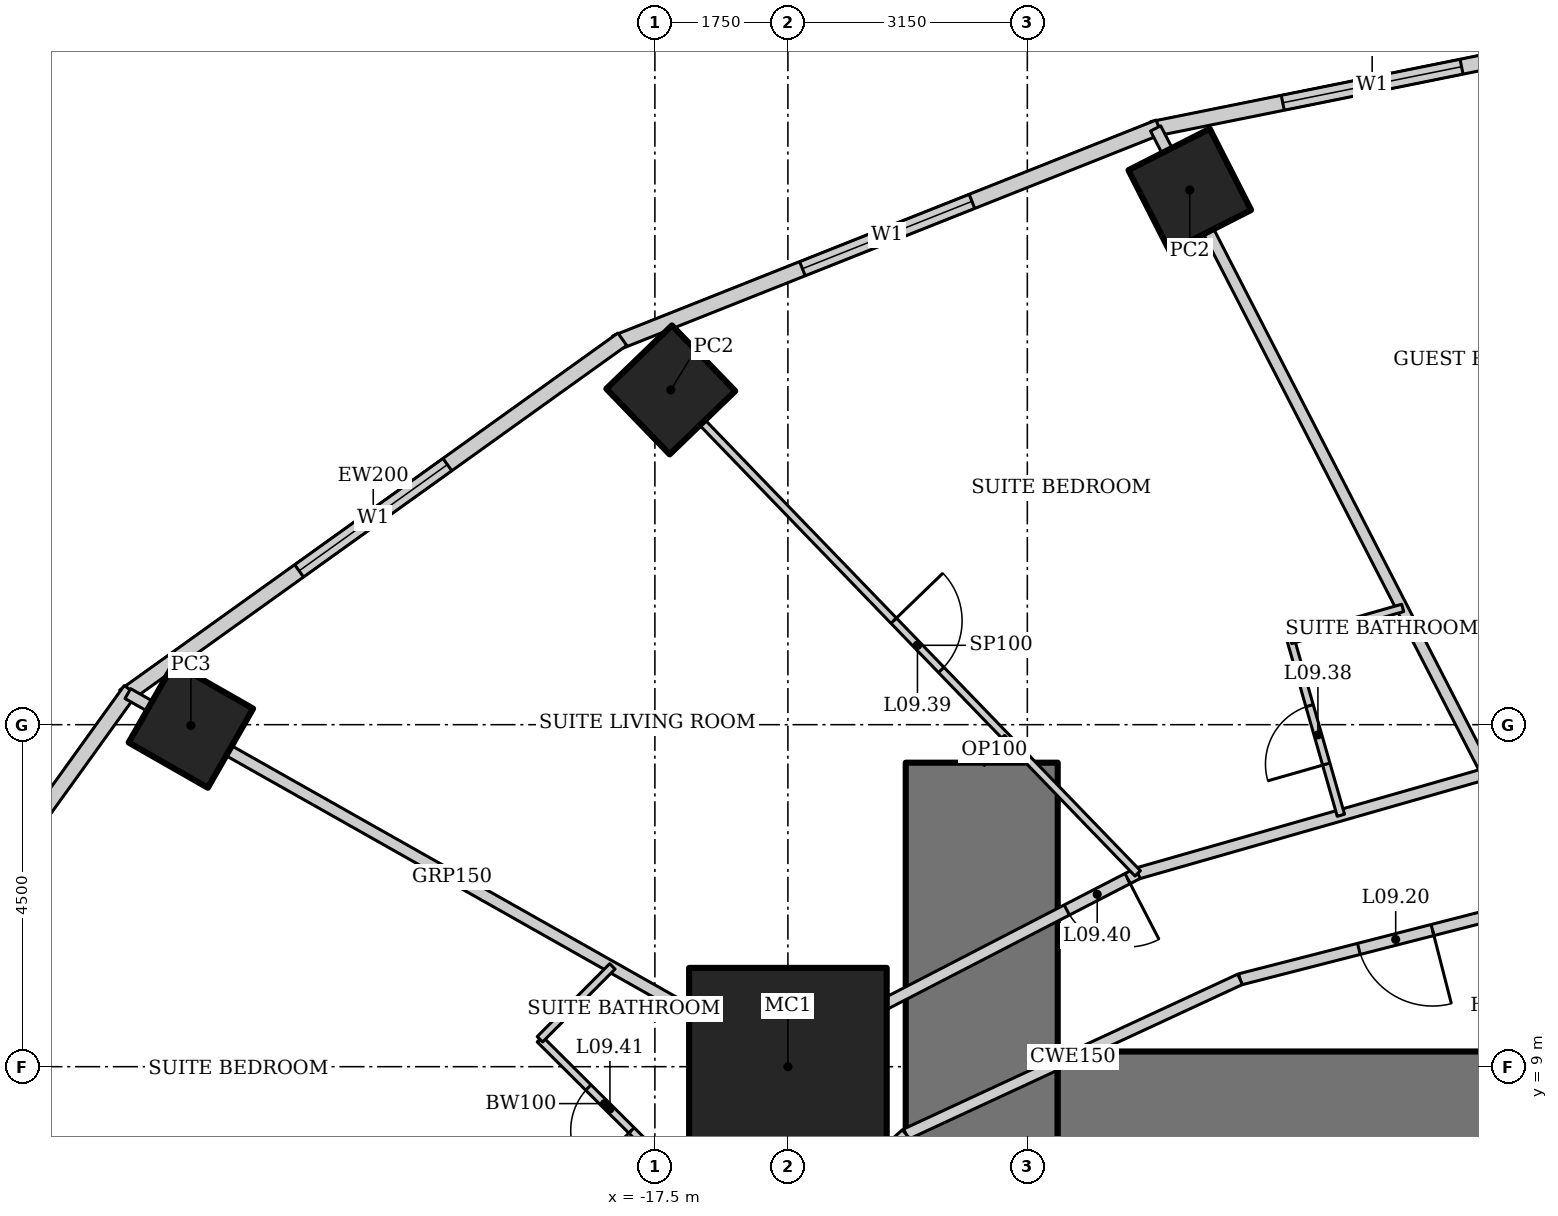
"""IFC4 building model, lengths in metres.
Left out: names, types, materials, properties, quantities, classifications, styles, units other than length and angle.
Written with IfcOpenShell. Run it as: python <this file> out.ifc"""

import sys

from ifc_helpers import new_model, si_unit, direction, frame, frame_2d, origin, origin_2d, place, context, subcontext, project, spatial, rectangle, hollow_rectangle, extrude, element, fill, save


model = new_model("IFC4")
c1 = context("Model", 3, precision=1e-05, world=origin(), true_north=direction((0.0, 1.0)))
c2 = subcontext(c1, "Body", "Model", "MODEL_VIEW")
j1 = project(units=[si_unit("LENGTHUNIT", "METRE"), si_unit("PLANEANGLEUNIT", "RADIAN")], contexts=[c1])
p1 = place(None, origin())
s1 = spatial("IfcSite", under=j1, at=p1, CompositionType="ELEMENT")
p2 = place(p1, origin())
s2 = spatial("IfcBuilding", under=s1, at=p2, CompositionType="ELEMENT")
p3 = place(p2, frame((0.0, 0.0, 47.8)))
s3 = spatial("IfcBuildingStorey", under=s2, at=p3, CompositionType="ELEMENT", Elevation=47.8)
p4 = place(p3, frame((-15.75, 9.0, 0.0), z_axis=(0.0, 0.0, 1.0), x_axis=(1.0, 0.0, 0.0)))
e1 = element("IfcColumn", 1, at=p4, inside=s3, PredefinedType="COLUMN", context=c2, shape_type="SweptSolid", body=[
    extrude(hollow_rectangle(XDim=2.6, YDim=2.6, WallThickness=0.13, at=origin_2d()), origin(), (0.0, 0.0, 1.0), 3.6),
])
for number, where, z_axis, x_axis in (
    (2, (-10.463, 20.534, 0.0), (0.0, 0.0, 1.0), (0.891, 0.454, 0.0)),
    (3, (-17.291, 17.905, 0.0), (0.0, 0.0, 1.0), (0.719, 0.695, 0.0)),
):
    element("IfcColumn", number, at=place(p3, frame(where, z_axis=z_axis, x_axis=x_axis)), inside=s3, PredefinedType="COLUMN", context=c2, shape_type="SweptSolid", body=[
        extrude(hollow_rectangle(XDim=1.2, YDim=1.2, WallThickness=0.1, at=origin_2d()), origin(), (0.0, 0.0, 1.0), 3.6),
    ])
p5 = place(p3, frame((-23.605, 13.489, 0.0), z_axis=(0.0, 0.0, 1.0), x_axis=(0.496139221777, 0.86824298017, 0.0)))
e4 = element("IfcColumn", 4, at=p5, inside=s3, PredefinedType="COLUMN", context=c2, shape_type="SweptSolid", body=[
    extrude(hollow_rectangle(XDim=1.2, YDim=1.2, WallThickness=0.12, at=origin_2d()), origin(), (0.0, 0.0, 1.0), 3.6),
])
p6 = place(p3, frame((-13.2, 13.0, 0.0), z_axis=(0.0, 0.0, 1.0), x_axis=(0.0, -1.0, 0.0)))
e5 = element("IfcWall", 5, at=p6, inside=s3, PredefinedType="SHEAR", context=c2, shape_type="SweptSolid", body=[
    extrude(rectangle(XDim=26.0, YDim=2.0, at=frame_2d((13.0, 0.0))), origin(), (0.0, 0.0, 1.0), 3.6),
])
p7 = place(p6, frame((12.1, 0.0, 0.0)))
e6 = element("IfcOpeningElement", 6, at=p7, cuts=e5, PredefinedType="OPENING", context=c2, shape_type="SweptSolid", body=[
    extrude(rectangle(XDim=1.8, YDim=2.1, at=frame_2d((0.9, 1.05))), frame((0.0, 1.01, 0.0), z_axis=(0.0, -1.0, 0.0), x_axis=(1.0, 0.0, 0.0)), (0.0, 0.0, 1.0), 2.02),
])
p8 = place(p3, frame((12.2, 8.0, 0.0), z_axis=(0.0, 0.0, 1.0), x_axis=(-1.0, 0.0, 0.0)))
e7 = element("IfcWall", 7, at=p8, inside=s3, PredefinedType="SHEAR", context=c2, shape_type="SweptSolid", body=[
    extrude(rectangle(XDim=24.4, YDim=2.4, at=frame_2d((12.2, 0.0))), origin(), (0.0, 0.0, 1.0), 3.6),
])
p9 = place(p3, frame((-5.17, 22.504, 0.0), z_axis=(0.0, 0.0, 1.0), x_axis=(-0.980251657452, -0.197754110105, 0.0)))
e8 = element("IfcWall", 8, at=p9, inside=s3, PredefinedType="SOLIDWALL", context=c2, shape_type="SweptSolid", body=[
    extrude(rectangle(XDim=5.904, YDim=0.2, at=frame_2d((2.952, 0.0))), origin(), (0.0, 0.0, 1.0), 3.45),
])
p10 = place(p9, frame((1.752, 0.0, 0.5)))
e9 = element("IfcOpeningElement", 9, at=p10, cuts=e8, PredefinedType="OPENING", context=c2, shape_type="SweptSolid", body=[
    extrude(rectangle(XDim=2.4, YDim=2.2, at=frame_2d((1.2, 1.1))), frame((0.0, 0.11, 0.0), z_axis=(0.0, -1.0, 0.0), x_axis=(1.0, 0.0, 0.0)), (0.0, 0.0, 1.0), 0.22),
])
p11 = place(p3, frame((-10.869, 21.363, 0.0), z_axis=(0.0, 0.0, 1.0), x_axis=(-0.929358351251, -0.369178892895, 0.0)))
e10 = element("IfcWall", 10, at=p11, inside=s3, PredefinedType="SOLIDWALL", context=c2, shape_type="SweptSolid", body=[
    extrude(rectangle(XDim=7.692, YDim=0.2, at=frame_2d((3.846, 0.0))), origin(), (0.0, 0.0, 1.0), 3.45),
])
p12 = place(p11, frame((2.646, 0.0, 0.5)))
e11 = element("IfcOpeningElement", 11, at=p12, cuts=e10, PredefinedType="OPENING", context=c2, shape_type="SweptSolid", body=[
    extrude(rectangle(XDim=2.4, YDim=2.2, at=frame_2d((1.2, 1.1))), frame((0.0, 0.11, 0.0), z_axis=(0.0, -1.0, 0.0), x_axis=(1.0, 0.0, 0.0)), (0.0, 0.0, 1.0), 0.22),
])
p13 = place(p3, frame((-17.929, 18.572, 0.0), z_axis=(0.0, 0.0, 1.0), x_axis=(-0.812791321576, -0.582554948112, 0.0)))
e12 = element("IfcWall", 12, at=p13, inside=s3, PredefinedType="SOLIDWALL", context=c2, shape_type="SweptSolid", body=[
    extrude(rectangle(XDim=8.063, YDim=0.2, at=frame_2d((4.032, 0.0))), origin(), (0.0, 0.0, 1.0), 3.45),
])
p14 = place(p13, frame((2.832, 0.0, 0.5)))
e13 = element("IfcOpeningElement", 13, at=p14, cuts=e12, PredefinedType="OPENING", context=c2, shape_type="SweptSolid", body=[
    extrude(rectangle(XDim=2.4, YDim=2.2, at=frame_2d((1.2, 1.1))), frame((0.0, 0.11, 0.0), z_axis=(0.0, -1.0, 0.0), x_axis=(1.0, 0.0, 0.0)), (0.0, 0.0, 1.0), 0.22),
])
p15 = place(p3, frame((-24.4, 13.957, 0.0), z_axis=(0.0, 0.0, 1.0), x_axis=(-0.583937613703, -0.811798536155, 0.0)))
e14 = element("IfcWall", 14, at=p15, inside=s3, PredefinedType="SOLIDWALL", context=c2, shape_type="SweptSolid", body=[
    extrude(rectangle(XDim=8.323, YDim=0.2, at=frame_2d((4.162, 0.0))), origin(), (0.0, 0.0, 1.0), 3.45),
])
p16 = place(p15, frame((2.961, 0.0, 0.5)))
e15 = element("IfcOpeningElement", 15, at=p16, cuts=e14, PredefinedType="OPENING", context=c2, shape_type="SweptSolid", body=[
    extrude(rectangle(XDim=2.4, YDim=2.2, at=frame_2d((1.2, 1.1))), frame((0.0, 0.11, 0.0), z_axis=(0.0, -1.0, 0.0), x_axis=(1.0, 0.0, 0.0)), (0.0, 0.0, 1.0), 0.22),
])
p17 = place(p3, frame((-10.912, 21.346, 0.0), z_axis=(0.0, 0.0, 1.0), x_axis=(0.456950233066, -0.889492262193, 0.0)))
e16 = element("IfcWall", 16, at=p17, inside=s3, PredefinedType="PARTITIONING", context=c2, shape_type="SweptSolid", body=[
    extrude(rectangle(XDim=9.542, YDim=0.15, at=frame_2d((4.771, 0.0))), origin(), (0.0, 0.0, 1.0), 2.528),
])
p18 = place(p3, frame((-24.435, 13.909, 0.0), z_axis=(0.0, 0.0, 1.0), x_axis=(0.870612006791, -0.491970256856, 0.0)))
e17 = element("IfcWall", 17, at=p18, inside=s3, PredefinedType="PARTITIONING", context=c2, shape_type="SweptSolid", body=[
    extrude(rectangle(XDim=9.802, YDim=0.15, at=frame_2d((4.901, 0.0))), origin(), (0.0, 0.0, 1.0), 2.693),
])
p19 = place(p3, frame((-6.552, 12.858, 0.0), z_axis=(0.0, 0.0, 1.0), x_axis=(-0.961464178199, -0.27493023486, 0.0)))
e18 = element("IfcWall", 18, at=p19, inside=s3, PredefinedType="PARTITIONING", context=c2, shape_type="SweptSolid", body=[
    extrude(rectangle(XDim=4.78, YDim=0.15, at=frame_2d((2.39, 0.0))), origin(), (0.0, 0.0, 1.0), 3.45),
])
p20 = place(p3, frame((-11.147, 11.544, 0.0), z_axis=(0.0, 0.0, 1.0), x_axis=(-0.888333171507, -0.459199495209, 0.0)))
e19 = element("IfcWall", 19, at=p20, inside=s3, PredefinedType="PARTITIONING", context=c2, shape_type="SweptSolid", body=[
    extrude(rectangle(XDim=5.351, YDim=0.15, at=frame_2d((2.676, 0.0))), origin(), (0.0, 0.0, 1.0), 3.45),
])
p21 = place(p20, frame((0.15, 0.0, 0.0)))
e20 = element("IfcOpeningElement", 20, at=p21, cuts=e19, PredefinedType="OPENING", context=c2, shape_type="SweptSolid", body=[
    extrude(rectangle(XDim=0.9, YDim=2.1, at=frame_2d((0.45, 1.05))), frame((0.0, 0.085, 0.0), z_axis=(0.0, -1.0, 0.0), x_axis=(1.0, 0.0, 0.0)), (0.0, 0.0, 1.0), 0.17),
])
p22 = place(p3, frame((-15.901, 9.086, 0.0), z_axis=(0.0, 0.0, 1.0), x_axis=(-0.705121546414, -0.709086457904, 0.0)))
e21 = element("IfcWall", 21, at=p22, inside=s3, PredefinedType="PARTITIONING", context=c2, shape_type="SweptSolid", body=[
    extrude(rectangle(XDim=5.788, YDim=0.15, at=frame_2d((2.894, 0.0))), origin(), (0.0, 0.0, 1.0), 3.45),
])
p23 = place(p3, frame((-5.706, 11.198, 0.0), z_axis=(0.0, 0.0, 1.0), x_axis=(-0.968705891355, -0.248211393886, 0.0)))
e22 = element("IfcWall", 22, at=p23, inside=s3, PredefinedType="PARTITIONING", context=c2, shape_type="SweptSolid", body=[
    extrude(rectangle(XDim=4.228, YDim=0.15, at=frame_2d((2.114, 0.0))), origin(), (0.0, 0.0, 1.0), 3.45),
])
p24 = place(p23, frame((1.614, 0.0, 0.0)))
e23 = element("IfcOpeningElement", 23, at=p24, cuts=e22, PredefinedType="OPENING", context=c2, shape_type="SweptSolid", body=[
    extrude(rectangle(XDim=1.0, YDim=2.1, at=frame_2d((0.5, 1.05))), frame((0.0, 0.085, 0.0), z_axis=(0.0, -1.0, 0.0), x_axis=(1.0, 0.0, 0.0)), (0.0, 0.0, 1.0), 0.17),
])
p25 = place(p3, frame((-9.801, 10.149, 0.0), z_axis=(0.0, 0.0, 1.0), x_axis=(-0.907279653965, -0.420527798727, 0.0)))
e24 = element("IfcWall", 24, at=p25, inside=s3, PredefinedType="PARTITIONING", context=c2, shape_type="SweptSolid", body=[
    extrude(rectangle(XDim=4.844, YDim=0.15, at=frame_2d((2.422, 0.0))), origin(), (0.0, 0.0, 1.0), 3.45),
])
p26 = place(p3, frame((-14.196, 8.112, 0.0), z_axis=(0.0, 0.0, 1.0), x_axis=(-0.742194222, -0.670184852731, 0.0)))
e25 = element("IfcWall", 25, at=p26, inside=s3, PredefinedType="PARTITIONING", context=c2, shape_type="SweptSolid", body=[
    extrude(rectangle(XDim=5.347, YDim=0.15, at=frame_2d((2.673, 0.0))), origin(), (0.0, 0.0, 1.0), 3.45),
])
p27 = place(p26, frame((2.173, 0.0, 0.0)))
e26 = element("IfcOpeningElement", 26, at=p27, cuts=e25, PredefinedType="OPENING", context=c2, shape_type="SweptSolid", body=[
    extrude(rectangle(XDim=1.0, YDim=2.1, at=frame_2d((0.5, 1.05))), frame((0.0, 0.085, 0.0), z_axis=(0.0, -1.0, 0.0), x_axis=(1.0, 0.0, 0.0)), (0.0, 0.0, 1.0), 0.17),
])
p28 = place(p3, frame((-8.474, 12.308, 0.0), z_axis=(0.0, 0.0, 1.0), x_axis=(-0.27497640313, 0.961450975205, 0.0)))
e27 = element("IfcWall", 27, at=p28, inside=s3, PredefinedType="PARTITIONING", context=c2, shape_type="SweptSolid", body=[
    extrude(rectangle(XDim=2.4, YDim=0.1, at=frame_2d((1.2, 0.0))), origin(), (0.0, 0.0, 1.0), 3.45),
])
p29 = place(p28, frame((0.7, 0.0, 0.0)))
e28 = element("IfcOpeningElement", 28, at=p29, cuts=e27, PredefinedType="OPENING", context=c2, shape_type="SweptSolid", body=[
    extrude(rectangle(XDim=0.8, YDim=2.1, at=frame_2d((0.4, 1.05))), frame((0.0, 0.06, 0.0), z_axis=(0.0, -1.0, 0.0), x_axis=(1.0, 0.0, 0.0)), (0.0, 0.0, 1.0), 0.12),
])
p30 = place(p3, frame((-9.134, 14.615, 0.0), z_axis=(0.0, 0.0, 1.0), x_axis=(0.96145775668, 0.274952690695, 0.0)))
e29 = element("IfcWall", 29, at=p30, inside=s3, PredefinedType="PARTITIONING", context=c2, shape_type="SweptSolid", body=[
    extrude(rectangle(XDim=1.532, YDim=0.1, at=frame_2d((0.766, 0.0))), origin(), (0.0, 0.0, 1.0), 3.45),
])
p31 = place(p3, frame((-16.944, 17.545, 0.0), z_axis=(0.0, 0.0, 1.0), x_axis=(0.694680670522, -0.71931826475, 0.0)))
e30 = element("IfcWall", 30, at=p31, inside=s3, PredefinedType="PARTITIONING", context=c2, shape_type="SweptSolid", body=[
    extrude(rectangle(XDim=8.344, YDim=0.1, at=frame_2d((4.172, 0.0))), origin(), (0.0, 0.0, 1.0), 2.528),
])
p32 = place(p31, frame((3.722, 0.0, 0.0)))
e31 = element("IfcOpeningElement", 31, at=p32, cuts=e30, PredefinedType="OPENING", context=c2, shape_type="SweptSolid", body=[
    extrude(rectangle(XDim=0.9, YDim=2.1, at=frame_2d((0.45, 1.05))), frame((0.0, 0.06, 0.0), z_axis=(0.0, -1.0, 0.0), x_axis=(1.0, 0.0, 0.0)), (0.0, 0.0, 1.0), 0.12),
])
p33 = place(p3, frame((-17.311, 7.668, 0.0), z_axis=(0.0, 0.0, 1.0), x_axis=(-0.709138392716, 0.705069315724, 0.0)))
e32 = element("IfcWall", 32, at=p33, inside=s3, PredefinedType="PARTITIONING", context=c2, shape_type="SweptSolid", body=[
    extrude(rectangle(XDim=2.4, YDim=0.1, at=frame_2d((1.2, 0.0))), origin(), (0.0, 0.0, 1.0), 3.45),
])
p34 = place(p33, frame((0.7, 0.0, 0.0)))
e33 = element("IfcOpeningElement", 33, at=p34, cuts=e32, PredefinedType="OPENING", context=c2, shape_type="SweptSolid", body=[
    extrude(rectangle(XDim=0.8, YDim=2.1, at=frame_2d((0.4, 1.05))), frame((0.0, 0.06, 0.0), z_axis=(0.0, -1.0, 0.0), x_axis=(1.0, 0.0, 0.0)), (0.0, 0.0, 1.0), 0.12),
])
p35 = place(p3, frame((-19.013, 9.36, 0.0), z_axis=(0.0, 0.0, 1.0), x_axis=(0.7051187611, 0.709089227633, 0.0)))
e34 = element("IfcWall", 34, at=p35, inside=s3, PredefinedType="PARTITIONING", context=c2, shape_type="SweptSolid", body=[
    extrude(rectangle(XDim=1.353, YDim=0.1, at=frame_2d((0.676, 0.0))), origin(), (0.0, 0.0, 1.0), 3.45),
])
p36 = place(p3, frame((-13.2, 13.0, 0.0), z_axis=(0.0, 0.0, 1.0), x_axis=(0.719347134512, 0.69465077562, 0.0)))
e35 = element("IfcWall", 35, at=p36, inside=s3, PredefinedType="PARTITIONING", context=c2, shape_type="SweptSolid", body=[
    extrude(rectangle(XDim=0.465, YDim=0.1, at=frame_2d((0.232, 0.0))), origin(), (0.0, 0.0, 1.0), 3.45),
])
p37 = place(p10, origin())
e36 = element("IfcWindow", 36, at=p37, inside=s3, PartitioningType="SINGLE_PANEL", PredefinedType="WINDOW", context=c2, shape_type="SweptSolid", body=[
    extrude(rectangle(XDim=2.4, YDim=2.2, at=frame_2d((1.2, 1.1))), frame((0.0, 0.03, 0.0), z_axis=(0.0, -1.0, 0.0), x_axis=(1.0, 0.0, 0.0)), (0.0, 0.0, 1.0), 0.06),
])
fill(e9, e36)
p38 = place(p12, origin())
e37 = element("IfcWindow", 37, at=p38, inside=s3, PartitioningType="SINGLE_PANEL", PredefinedType="WINDOW", context=c2, shape_type="SweptSolid", body=[
    extrude(rectangle(XDim=2.4, YDim=2.2, at=frame_2d((1.2, 1.1))), frame((0.0, 0.03, 0.0), z_axis=(0.0, -1.0, 0.0), x_axis=(1.0, 0.0, 0.0)), (0.0, 0.0, 1.0), 0.06),
])
fill(e11, e37)
p39 = place(p14, origin())
e38 = element("IfcWindow", 38, at=p39, inside=s3, PartitioningType="SINGLE_PANEL", PredefinedType="WINDOW", context=c2, shape_type="SweptSolid", body=[
    extrude(rectangle(XDim=2.4, YDim=2.2, at=frame_2d((1.2, 1.1))), frame((0.0, 0.03, 0.0), z_axis=(0.0, -1.0, 0.0), x_axis=(1.0, 0.0, 0.0)), (0.0, 0.0, 1.0), 0.06),
])
fill(e13, e38)
p40 = place(p24, origin())
e39 = element("IfcDoor", 39, at=p40, inside=s3, OperationType="SINGLE_SWING_LEFT", PredefinedType="DOOR", context=c2, shape_type="SweptSolid", body=[
    extrude(rectangle(XDim=1.0, YDim=2.1, at=frame_2d((0.5, 1.05))), frame((0.0, 0.025, 0.0), z_axis=(0.0, -1.0, 0.0), x_axis=(1.0, 0.0, 0.0)), (0.0, 0.0, 1.0), 0.05),
])
fill(e23, e39)
p41 = place(p29, origin())
e40 = element("IfcDoor", 40, at=p41, inside=s3, OperationType="SINGLE_SWING_LEFT", PredefinedType="DOOR", context=c2, shape_type="SweptSolid", body=[
    extrude(rectangle(XDim=0.8, YDim=2.1, at=frame_2d((0.4, 1.05))), frame((0.0, 0.025, 0.0), z_axis=(0.0, -1.0, 0.0), x_axis=(1.0, 0.0, 0.0)), (0.0, 0.0, 1.0), 0.05),
])
fill(e28, e40)
p42 = place(p32, origin())
e41 = element("IfcDoor", 41, at=p42, inside=s3, OperationType="SINGLE_SWING_LEFT", PredefinedType="DOOR", context=c2, shape_type="SweptSolid", body=[
    extrude(rectangle(XDim=0.9, YDim=2.1, at=frame_2d((0.45, 1.05))), frame((0.0, 0.025, 0.0), z_axis=(0.0, -1.0, 0.0), x_axis=(1.0, 0.0, 0.0)), (0.0, 0.0, 1.0), 0.05),
])
fill(e31, e41)
p43 = place(p21, origin())
e42 = element("IfcDoor", 42, at=p43, inside=s3, OperationType="SINGLE_SWING_LEFT", PredefinedType="DOOR", context=c2, shape_type="SweptSolid", body=[
    extrude(rectangle(XDim=0.9, YDim=2.1, at=frame_2d((0.45, 1.05))), frame((0.0, 0.025, 0.0), z_axis=(0.0, -1.0, 0.0), x_axis=(1.0, 0.0, 0.0)), (0.0, 0.0, 1.0), 0.05),
])
fill(e20, e42)
p44 = place(p34, origin())
e43 = element("IfcDoor", 43, at=p44, inside=s3, OperationType="SINGLE_SWING_LEFT", PredefinedType="DOOR", context=c2, shape_type="SweptSolid", body=[
    extrude(rectangle(XDim=0.8, YDim=2.1, at=frame_2d((0.4, 1.05))), frame((0.0, 0.025, 0.0), z_axis=(0.0, -1.0, 0.0), x_axis=(1.0, 0.0, 0.0)), (0.0, 0.0, 1.0), 0.05),
])
fill(e33, e43)
save(model, sys.argv[1])
